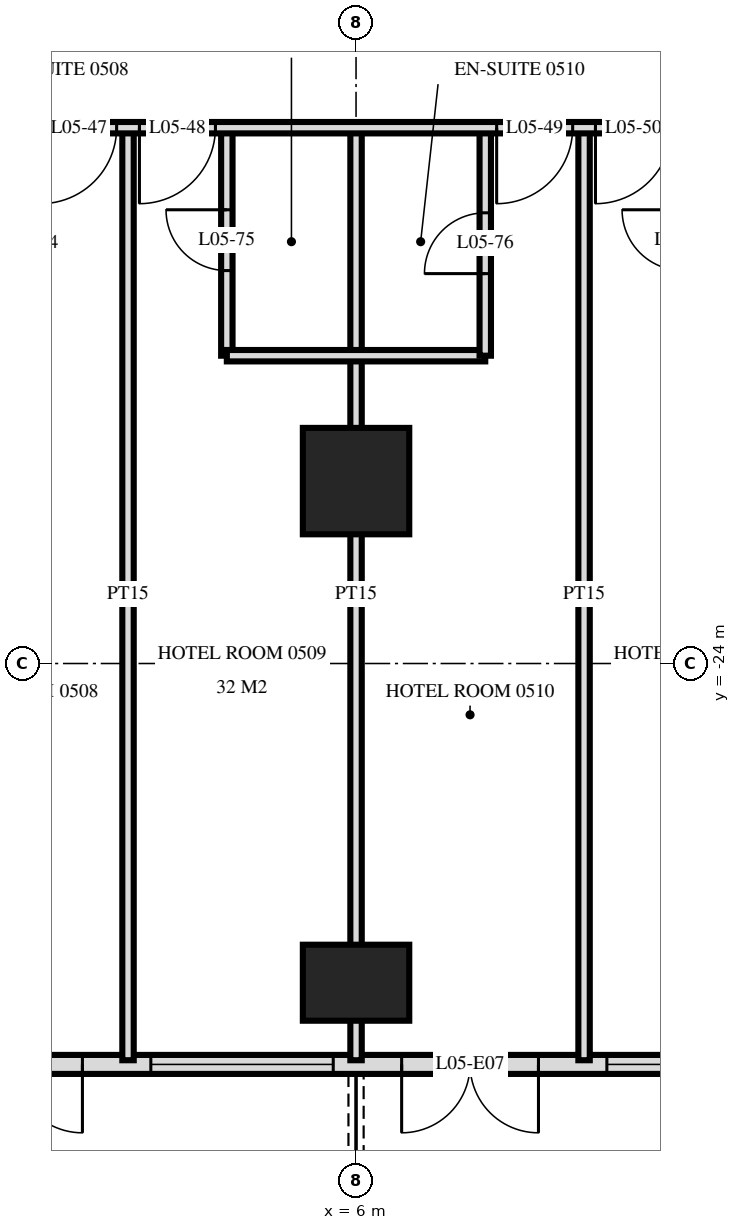
"""IFC4 building model, lengths in metres.
Left out: names, types, materials, properties, quantities, classifications, styles, units other than length and angle.
Written with IfcOpenShell. Run it as: python <this file> out.ifc"""

import sys

from ifc_helpers import new_model, si_unit, direction, frame, frame_2d, origin, origin_2d, place, context, subcontext, project, spatial, rectangle, extrude, element, fill, save


model = new_model("IFC4")
c1 = context("Model", 3, precision=1e-05, world=origin(), true_north=direction((0.0, 1.0)))
c2 = subcontext(c1, "Body", "Model", "MODEL_VIEW")
j1 = project(units=[si_unit("LENGTHUNIT", "METRE"), si_unit("PLANEANGLEUNIT", "RADIAN")], contexts=[c1])
p1 = place(None, origin())
s1 = spatial("IfcSite", under=j1, at=p1, CompositionType="ELEMENT")
p2 = place(p1, origin())
s2 = spatial("IfcBuilding", under=s1, at=p2, CompositionType="ELEMENT")
p3 = place(p2, frame((0.0, 0.0, 27.6)))
s3 = spatial("IfcBuildingStorey", under=s2, at=p3, CompositionType="ELEMENT", Elevation=27.6)
p4 = place(p3, frame((6.0, -28.2, 0.0), z_axis=(0.0, 0.0, 1.0), x_axis=(1.0, 0.0, 0.0)))
e1 = element("IfcColumn", 1, at=p4, inside=s3, PredefinedType="COLUMN", context=c2, shape_type="SweptSolid", body=[
    extrude(rectangle(XDim=1.4, YDim=1.0, at=origin_2d()), origin(), (0.0, 0.0, 1.0), 3.6),
])
p5 = place(p3, frame((6.0, -21.6, 0.0), z_axis=(0.0, 0.0, 1.0), x_axis=(1.0, 0.0, 0.0)))
e2 = element("IfcColumn", 2, at=p5, inside=s3, PredefinedType="COLUMN", context=c2, shape_type="SweptSolid", body=[
    extrude(rectangle(XDim=1.4, YDim=1.4, at=origin_2d()), origin(), (0.0, 0.0, 1.0), 3.6),
])
p6 = place(p3, frame((-28.775, -29.275, 0.0), z_axis=(0.0, 0.0, 1.0), x_axis=(1.0, 0.0, 0.0)))
e3 = element("IfcWall", 3, at=p6, inside=s3, PredefinedType="SOLIDWALL", context=c2, shape_type="SweptSolid", body=[
    extrude(rectangle(XDim=57.551, YDim=0.25, at=frame_2d((28.775, 0.0))), origin(), (0.0, 0.0, 1.0), 3.32),
])
p7 = place(p6, frame((0.575, 0.0, 0.0)))
e4 = element("IfcOpeningElement", 4, at=p7, cuts=e3, PredefinedType="OPENING", context=c2, shape_type="SweptSolid", body=[
    extrude(rectangle(XDim=1.8, YDim=2.4, at=frame_2d((0.9, 1.2))), frame((0.0, 0.135, 0.0), z_axis=(0.0, -1.0, 0.0), x_axis=(1.0, 0.0, 0.0)), (0.0, 0.0, 1.0), 0.27),
])
p8 = place(p6, frame((5.375, 0.0, 0.0)))
e5 = element("IfcOpeningElement", 5, at=p8, cuts=e3, PredefinedType="OPENING", context=c2, shape_type="SweptSolid", body=[
    extrude(rectangle(XDim=1.8, YDim=2.4, at=frame_2d((0.9, 1.2))), frame((0.0, 0.135, 0.0), z_axis=(0.0, -1.0, 0.0), x_axis=(1.0, 0.0, 0.0)), (0.0, 0.0, 1.0), 0.27),
])
p9 = place(p6, frame((8.075, 0.0, 0.3)))
e6 = element("IfcOpeningElement", 6, at=p9, cuts=e3, PredefinedType="OPENING", context=c2, shape_type="SweptSolid", body=[
    extrude(rectangle(XDim=2.4, YDim=2.1, at=frame_2d((1.2, 1.05))), frame((0.0, 0.135, 0.0), z_axis=(0.0, -1.0, 0.0), x_axis=(1.0, 0.0, 0.0)), (0.0, 0.0, 1.0), 0.27),
])
p10 = place(p6, frame((11.375, 0.0, 0.0)))
e7 = element("IfcOpeningElement", 7, at=p10, cuts=e3, PredefinedType="OPENING", context=c2, shape_type="SweptSolid", body=[
    extrude(rectangle(XDim=1.8, YDim=2.4, at=frame_2d((0.9, 1.2))), frame((0.0, 0.135, 0.0), z_axis=(0.0, -1.0, 0.0), x_axis=(1.0, 0.0, 0.0)), (0.0, 0.0, 1.0), 0.27),
])
p11 = place(p6, frame((14.075, 0.0, 0.3)))
e8 = element("IfcOpeningElement", 8, at=p11, cuts=e3, PredefinedType="OPENING", context=c2, shape_type="SweptSolid", body=[
    extrude(rectangle(XDim=2.4, YDim=2.1, at=frame_2d((1.2, 1.05))), frame((0.0, 0.135, 0.0), z_axis=(0.0, -1.0, 0.0), x_axis=(1.0, 0.0, 0.0)), (0.0, 0.0, 1.0), 0.27),
])
p12 = place(p6, frame((17.375, 0.0, 0.0)))
e9 = element("IfcOpeningElement", 9, at=p12, cuts=e3, PredefinedType="OPENING", context=c2, shape_type="SweptSolid", body=[
    extrude(rectangle(XDim=1.8, YDim=2.4, at=frame_2d((0.9, 1.2))), frame((0.0, 0.135, 0.0), z_axis=(0.0, -1.0, 0.0), x_axis=(1.0, 0.0, 0.0)), (0.0, 0.0, 1.0), 0.27),
])
p13 = place(p6, frame((20.075, 0.0, 0.3)))
e10 = element("IfcOpeningElement", 10, at=p13, cuts=e3, PredefinedType="OPENING", context=c2, shape_type="SweptSolid", body=[
    extrude(rectangle(XDim=2.4, YDim=2.1, at=frame_2d((1.2, 1.05))), frame((0.0, 0.135, 0.0), z_axis=(0.0, -1.0, 0.0), x_axis=(1.0, 0.0, 0.0)), (0.0, 0.0, 1.0), 0.27),
])
p14 = place(p6, frame((23.075, 0.0, 0.3)))
e11 = element("IfcOpeningElement", 11, at=p14, cuts=e3, PredefinedType="OPENING", context=c2, shape_type="SweptSolid", body=[
    extrude(rectangle(XDim=2.4, YDim=2.1, at=frame_2d((1.2, 1.05))), frame((0.0, 0.135, 0.0), z_axis=(0.0, -1.0, 0.0), x_axis=(1.0, 0.0, 0.0)), (0.0, 0.0, 1.0), 0.27),
])
p15 = place(p6, frame((26.375, 0.0, 0.0)))
e12 = element("IfcOpeningElement", 12, at=p15, cuts=e3, PredefinedType="OPENING", context=c2, shape_type="SweptSolid", body=[
    extrude(rectangle(XDim=1.8, YDim=2.4, at=frame_2d((0.9, 1.2))), frame((0.0, 0.135, 0.0), z_axis=(0.0, -1.0, 0.0), x_axis=(1.0, 0.0, 0.0)), (0.0, 0.0, 1.0), 0.27),
])
p16 = place(p6, frame((29.375, 0.0, 0.0)))
e13 = element("IfcOpeningElement", 13, at=p16, cuts=e3, PredefinedType="OPENING", context=c2, shape_type="SweptSolid", body=[
    extrude(rectangle(XDim=1.8, YDim=2.4, at=frame_2d((0.9, 1.2))), frame((0.0, 0.135, 0.0), z_axis=(0.0, -1.0, 0.0), x_axis=(1.0, 0.0, 0.0)), (0.0, 0.0, 1.0), 0.27),
])
p17 = place(p6, frame((32.075, 0.0, 0.3)))
e14 = element("IfcOpeningElement", 14, at=p17, cuts=e3, PredefinedType="OPENING", context=c2, shape_type="SweptSolid", body=[
    extrude(rectangle(XDim=2.4, YDim=2.1, at=frame_2d((1.2, 1.05))), frame((0.0, 0.135, 0.0), z_axis=(0.0, -1.0, 0.0), x_axis=(1.0, 0.0, 0.0)), (0.0, 0.0, 1.0), 0.27),
])
p18 = place(p6, frame((35.375, 0.0, 0.0)))
e15 = element("IfcOpeningElement", 15, at=p18, cuts=e3, PredefinedType="OPENING", context=c2, shape_type="SweptSolid", body=[
    extrude(rectangle(XDim=1.8, YDim=2.4, at=frame_2d((0.9, 1.2))), frame((0.0, 0.135, 0.0), z_axis=(0.0, -1.0, 0.0), x_axis=(1.0, 0.0, 0.0)), (0.0, 0.0, 1.0), 0.27),
])
p19 = place(p6, frame((38.075, 0.0, 0.3)))
e16 = element("IfcOpeningElement", 16, at=p19, cuts=e3, PredefinedType="OPENING", context=c2, shape_type="SweptSolid", body=[
    extrude(rectangle(XDim=2.4, YDim=2.1, at=frame_2d((1.2, 1.05))), frame((0.0, 0.135, 0.0), z_axis=(0.0, -1.0, 0.0), x_axis=(1.0, 0.0, 0.0)), (0.0, 0.0, 1.0), 0.27),
])
p20 = place(p6, frame((41.375, 0.0, 0.0)))
e17 = element("IfcOpeningElement", 17, at=p20, cuts=e3, PredefinedType="OPENING", context=c2, shape_type="SweptSolid", body=[
    extrude(rectangle(XDim=1.8, YDim=2.4, at=frame_2d((0.9, 1.2))), frame((0.0, 0.135, 0.0), z_axis=(0.0, -1.0, 0.0), x_axis=(1.0, 0.0, 0.0)), (0.0, 0.0, 1.0), 0.27),
])
p21 = place(p6, frame((44.075, 0.0, 0.3)))
e18 = element("IfcOpeningElement", 18, at=p21, cuts=e3, PredefinedType="OPENING", context=c2, shape_type="SweptSolid", body=[
    extrude(rectangle(XDim=2.4, YDim=2.1, at=frame_2d((1.2, 1.05))), frame((0.0, 0.135, 0.0), z_axis=(0.0, -1.0, 0.0), x_axis=(1.0, 0.0, 0.0)), (0.0, 0.0, 1.0), 0.27),
])
p22 = place(p6, frame((47.075, 0.0, 0.3)))
e19 = element("IfcOpeningElement", 19, at=p22, cuts=e3, PredefinedType="OPENING", context=c2, shape_type="SweptSolid", body=[
    extrude(rectangle(XDim=2.4, YDim=2.1, at=frame_2d((1.2, 1.05))), frame((0.0, 0.135, 0.0), z_axis=(0.0, -1.0, 0.0), x_axis=(1.0, 0.0, 0.0)), (0.0, 0.0, 1.0), 0.27),
])
p23 = place(p6, frame((50.375, 0.0, 0.0)))
e20 = element("IfcOpeningElement", 20, at=p23, cuts=e3, PredefinedType="OPENING", context=c2, shape_type="SweptSolid", body=[
    extrude(rectangle(XDim=1.8, YDim=2.4, at=frame_2d((0.9, 1.2))), frame((0.0, 0.135, 0.0), z_axis=(0.0, -1.0, 0.0), x_axis=(1.0, 0.0, 0.0)), (0.0, 0.0, 1.0), 0.27),
])
p24 = place(p6, frame((53.375, 0.0, 0.0)))
e21 = element("IfcOpeningElement", 21, at=p24, cuts=e3, PredefinedType="OPENING", context=c2, shape_type="SweptSolid", body=[
    extrude(rectangle(XDim=1.8, YDim=2.4, at=frame_2d((0.9, 1.2))), frame((0.0, 0.135, 0.0), z_axis=(0.0, -1.0, 0.0), x_axis=(1.0, 0.0, 0.0)), (0.0, 0.0, 1.0), 0.27),
])
p25 = place(p3, frame((9.0, -29.22, 0.0), z_axis=(0.0, 0.0, 1.0), x_axis=(0.0, 1.0, 0.0)))
e22 = element("IfcWall", 22, at=p25, inside=s3, PredefinedType="PARTITIONING", context=c2, shape_type="SweptSolid", body=[
    extrude(rectangle(XDim=12.27, YDim=0.15, at=frame_2d((6.135, 0.0))), origin(), (0.0, 0.0, 1.0), 3.32),
])
p26 = place(p3, frame((7.7, -19.95, 0.0), z_axis=(0.0, 0.0, 1.0), x_axis=(0.0, 1.0, 0.0)))
e23 = element("IfcWall", 23, at=p26, inside=s3, PredefinedType="PARTITIONING", context=c2, shape_type="SweptSolid", body=[
    extrude(rectangle(XDim=3.0, YDim=0.15, at=frame_2d((1.5, 0.0))), origin(), (0.0, 0.0, 1.0), 3.32),
])
p27 = place(p26, frame((1.08, 0.0, 0.0)))
e24 = element("IfcOpeningElement", 24, at=p27, cuts=e23, PredefinedType="OPENING", context=c2, shape_type="SweptSolid", body=[
    extrude(rectangle(XDim=0.8, YDim=2.1, at=frame_2d((0.4, 1.05))), frame((0.0, 0.085, 0.0), z_axis=(0.0, -1.0, 0.0), x_axis=(1.0, 0.0, 0.0)), (0.0, 0.0, 1.0), 0.17),
])
p28 = place(p3, frame((6.0, -29.22, 0.0), z_axis=(0.0, 0.0, 1.0), x_axis=(0.0, 1.0, 0.0)))
e25 = element("IfcWall", 25, at=p28, inside=s3, PredefinedType="PARTITIONING", context=c2, shape_type="SweptSolid", body=[
    extrude(rectangle(XDim=12.27, YDim=0.15, at=frame_2d((6.135, 0.0))), origin(), (0.0, 0.0, 1.0), 3.32),
])
p29 = place(p3, frame((4.3, -19.95, 0.0), z_axis=(0.0, 0.0, 1.0), x_axis=(0.0, 1.0, 0.0)))
e26 = element("IfcWall", 26, at=p29, inside=s3, PredefinedType="PARTITIONING", context=c2, shape_type="SweptSolid", body=[
    extrude(rectangle(XDim=3.0, YDim=0.15, at=frame_2d((1.5, 0.0))), origin(), (0.0, 0.0, 1.0), 3.32),
])
p30 = place(p29, frame((1.12, 0.0, 0.0)))
e27 = element("IfcOpeningElement", 27, at=p30, cuts=e26, PredefinedType="OPENING", context=c2, shape_type="SweptSolid", body=[
    extrude(rectangle(XDim=0.8, YDim=2.1, at=frame_2d((0.4, 1.05))), frame((0.0, 0.085, 0.0), z_axis=(0.0, -1.0, 0.0), x_axis=(1.0, 0.0, 0.0)), (0.0, 0.0, 1.0), 0.17),
])
p31 = place(p3, frame((3.0, -29.22, 0.0), z_axis=(0.0, 0.0, 1.0), x_axis=(0.0, 1.0, 0.0)))
e28 = element("IfcWall", 28, at=p31, inside=s3, PredefinedType="PARTITIONING", context=c2, shape_type="SweptSolid", body=[
    extrude(rectangle(XDim=12.27, YDim=0.15, at=frame_2d((6.135, 0.0))), origin(), (0.0, 0.0, 1.0), 3.32),
])
p32 = place(p3, frame((4.3, -19.95, 0.0), z_axis=(0.0, 0.0, 1.0), x_axis=(1.0, 0.0, 0.0)))
e29 = element("IfcWall", 29, at=p32, inside=s3, PredefinedType="PARTITIONING", context=c2, shape_type="SweptSolid", body=[
    extrude(rectangle(XDim=3.4, YDim=0.15, at=frame_2d((1.7, 0.0))), origin(), (0.0, 0.0, 1.0), 3.32),
])
p33 = place(p3, frame((-33.12, -16.95, 0.0), z_axis=(0.0, 0.0, 1.0), x_axis=(1.0, 0.0, 0.0)))
e30 = element("IfcWall", 30, at=p33, inside=s3, PredefinedType="PARTITIONING", context=c2, shape_type="SweptSolid", body=[
    extrude(rectangle(XDim=66.24, YDim=0.15, at=frame_2d((33.12, 0.0))), origin(), (0.0, 0.0, 1.0), 3.32),
])
p34 = place(p33, frame((9.27, 0.0, 0.0)))
e31 = element("IfcOpeningElement", 31, at=p34, cuts=e30, PredefinedType="OPENING", context=c2, shape_type="SweptSolid", body=[
    extrude(rectangle(XDim=1.0, YDim=2.1, at=frame_2d((0.5, 1.05))), frame((0.0, 0.085, 0.0), z_axis=(0.0, -1.0, 0.0), x_axis=(1.0, 0.0, 0.0)), (0.0, 0.0, 1.0), 0.17),
])
p35 = place(p33, frame((13.97, 0.0, 0.0)))
e32 = element("IfcOpeningElement", 32, at=p35, cuts=e30, PredefinedType="OPENING", context=c2, shape_type="SweptSolid", body=[
    extrude(rectangle(XDim=1.0, YDim=2.1, at=frame_2d((0.5, 1.05))), frame((0.0, 0.085, 0.0), z_axis=(0.0, -1.0, 0.0), x_axis=(1.0, 0.0, 0.0)), (0.0, 0.0, 1.0), 0.17),
])
p36 = place(p33, frame((15.27, 0.0, 0.0)))
e33 = element("IfcOpeningElement", 33, at=p36, cuts=e30, PredefinedType="OPENING", context=c2, shape_type="SweptSolid", body=[
    extrude(rectangle(XDim=1.0, YDim=2.1, at=frame_2d((0.5, 1.05))), frame((0.0, 0.085, 0.0), z_axis=(0.0, -1.0, 0.0), x_axis=(1.0, 0.0, 0.0)), (0.0, 0.0, 1.0), 0.17),
])
p37 = place(p33, frame((19.97, 0.0, 0.0)))
e34 = element("IfcOpeningElement", 34, at=p37, cuts=e30, PredefinedType="OPENING", context=c2, shape_type="SweptSolid", body=[
    extrude(rectangle(XDim=1.0, YDim=2.1, at=frame_2d((0.5, 1.05))), frame((0.0, 0.085, 0.0), z_axis=(0.0, -1.0, 0.0), x_axis=(1.0, 0.0, 0.0)), (0.0, 0.0, 1.0), 0.17),
])
p38 = place(p33, frame((22.27, 0.0, 0.0)))
e35 = element("IfcOpeningElement", 35, at=p38, cuts=e30, PredefinedType="OPENING", context=c2, shape_type="SweptSolid", body=[
    extrude(rectangle(XDim=1.0, YDim=2.1, at=frame_2d((0.5, 1.05))), frame((0.0, 0.085, 0.0), z_axis=(0.0, -1.0, 0.0), x_axis=(1.0, 0.0, 0.0)), (0.0, 0.0, 1.0), 0.17),
])
p39 = place(p33, frame((28.97, 0.0, 0.0)))
e36 = element("IfcOpeningElement", 36, at=p39, cuts=e30, PredefinedType="OPENING", context=c2, shape_type="SweptSolid", body=[
    extrude(rectangle(XDim=1.0, YDim=2.1, at=frame_2d((0.5, 1.05))), frame((0.0, 0.085, 0.0), z_axis=(0.0, -1.0, 0.0), x_axis=(1.0, 0.0, 0.0)), (0.0, 0.0, 1.0), 0.17),
])
p40 = place(p33, frame((30.27, 0.0, 0.0)))
e37 = element("IfcOpeningElement", 37, at=p40, cuts=e30, PredefinedType="OPENING", context=c2, shape_type="SweptSolid", body=[
    extrude(rectangle(XDim=1.0, YDim=2.1, at=frame_2d((0.5, 1.05))), frame((0.0, 0.085, 0.0), z_axis=(0.0, -1.0, 0.0), x_axis=(1.0, 0.0, 0.0)), (0.0, 0.0, 1.0), 0.17),
])
p41 = place(p33, frame((34.97, 0.0, 0.0)))
e38 = element("IfcOpeningElement", 38, at=p41, cuts=e30, PredefinedType="OPENING", context=c2, shape_type="SweptSolid", body=[
    extrude(rectangle(XDim=1.0, YDim=2.1, at=frame_2d((0.5, 1.05))), frame((0.0, 0.085, 0.0), z_axis=(0.0, -1.0, 0.0), x_axis=(1.0, 0.0, 0.0)), (0.0, 0.0, 1.0), 0.17),
])
p42 = place(p33, frame((36.27, 0.0, 0.0)))
e39 = element("IfcOpeningElement", 39, at=p42, cuts=e30, PredefinedType="OPENING", context=c2, shape_type="SweptSolid", body=[
    extrude(rectangle(XDim=1.0, YDim=2.1, at=frame_2d((0.5, 1.05))), frame((0.0, 0.085, 0.0), z_axis=(0.0, -1.0, 0.0), x_axis=(1.0, 0.0, 0.0)), (0.0, 0.0, 1.0), 0.17),
])
p43 = place(p33, frame((40.97, 0.0, 0.0)))
e40 = element("IfcOpeningElement", 40, at=p43, cuts=e30, PredefinedType="OPENING", context=c2, shape_type="SweptSolid", body=[
    extrude(rectangle(XDim=1.0, YDim=2.1, at=frame_2d((0.5, 1.05))), frame((0.0, 0.085, 0.0), z_axis=(0.0, -1.0, 0.0), x_axis=(1.0, 0.0, 0.0)), (0.0, 0.0, 1.0), 0.17),
])
p44 = place(p33, frame((42.27, 0.0, 0.0)))
e41 = element("IfcOpeningElement", 41, at=p44, cuts=e30, PredefinedType="OPENING", context=c2, shape_type="SweptSolid", body=[
    extrude(rectangle(XDim=1.0, YDim=2.1, at=frame_2d((0.5, 1.05))), frame((0.0, 0.085, 0.0), z_axis=(0.0, -1.0, 0.0), x_axis=(1.0, 0.0, 0.0)), (0.0, 0.0, 1.0), 0.17),
])
p45 = place(p33, frame((46.97, 0.0, 0.0)))
e42 = element("IfcOpeningElement", 42, at=p45, cuts=e30, PredefinedType="OPENING", context=c2, shape_type="SweptSolid", body=[
    extrude(rectangle(XDim=1.0, YDim=2.1, at=frame_2d((0.5, 1.05))), frame((0.0, 0.085, 0.0), z_axis=(0.0, -1.0, 0.0), x_axis=(1.0, 0.0, 0.0)), (0.0, 0.0, 1.0), 0.17),
])
p46 = place(p33, frame((48.27, 0.0, 0.0)))
e43 = element("IfcOpeningElement", 43, at=p46, cuts=e30, PredefinedType="OPENING", context=c2, shape_type="SweptSolid", body=[
    extrude(rectangle(XDim=1.0, YDim=2.1, at=frame_2d((0.5, 1.05))), frame((0.0, 0.085, 0.0), z_axis=(0.0, -1.0, 0.0), x_axis=(1.0, 0.0, 0.0)), (0.0, 0.0, 1.0), 0.17),
])
p47 = place(p33, frame((52.97, 0.0, 0.0)))
e44 = element("IfcOpeningElement", 44, at=p47, cuts=e30, PredefinedType="OPENING", context=c2, shape_type="SweptSolid", body=[
    extrude(rectangle(XDim=1.0, YDim=2.1, at=frame_2d((0.5, 1.05))), frame((0.0, 0.085, 0.0), z_axis=(0.0, -1.0, 0.0), x_axis=(1.0, 0.0, 0.0)), (0.0, 0.0, 1.0), 0.17),
])
p48 = place(p33, frame((54.27, 0.0, 0.0)))
e45 = element("IfcOpeningElement", 45, at=p48, cuts=e30, PredefinedType="OPENING", context=c2, shape_type="SweptSolid", body=[
    extrude(rectangle(XDim=1.0, YDim=2.1, at=frame_2d((0.5, 1.05))), frame((0.0, 0.085, 0.0), z_axis=(0.0, -1.0, 0.0), x_axis=(1.0, 0.0, 0.0)), (0.0, 0.0, 1.0), 0.17),
])
p49 = place(p33, frame((4.4, 0.0, 0.0)))
e46 = element("IfcOpeningElement", 46, at=p49, cuts=e30, PredefinedType="OPENING", context=c2, shape_type="SweptSolid", body=[
    extrude(rectangle(XDim=1.0, YDim=2.1, at=frame_2d((0.5, 1.05))), frame((0.0, 0.085, 0.0), z_axis=(0.0, -1.0, 0.0), x_axis=(1.0, 0.0, 0.0)), (0.0, 0.0, 1.0), 0.17),
])
p50 = place(p33, frame((60.8, 0.0, 0.0)))
e47 = element("IfcOpeningElement", 47, at=p50, cuts=e30, PredefinedType="OPENING", context=c2, shape_type="SweptSolid", body=[
    extrude(rectangle(XDim=1.0, YDim=2.1, at=frame_2d((0.5, 1.05))), frame((0.0, 0.085, 0.0), z_axis=(0.0, -1.0, 0.0), x_axis=(1.0, 0.0, 0.0)), (0.0, 0.0, 1.0), 0.17),
])
p51 = place(p16, frame((0.9, 0.0, 0.0), z_axis=(0.0, 0.0, 1.0), x_axis=(-1.0, 0.0, 0.0)))
e48 = element("IfcDoor", 48, at=p51, inside=s3, OperationType="DOUBLE_DOOR_SINGLE_SWING", PredefinedType="DOOR", context=c2, shape_type="SweptSolid", body=[
    extrude(rectangle(XDim=1.8, YDim=2.4, at=frame_2d((0.0, 1.2))), frame((0.0, -0.025, 0.0), z_axis=(0.0, 1.0, 0.0), x_axis=(-1.0, 0.0, 0.0)), (0.0, 0.0, 1.0), 0.05),
])
fill(e13, e48)
p52 = place(p17, origin())
e49 = element("IfcWindow", 49, at=p52, inside=s3, PartitioningType="SINGLE_PANEL", PredefinedType="WINDOW", context=c2, shape_type="SweptSolid", body=[
    extrude(rectangle(XDim=2.4, YDim=2.1, at=frame_2d((1.2, 1.05))), frame((0.0, 0.03, 0.0), z_axis=(0.0, -1.0, 0.0), x_axis=(1.0, 0.0, 0.0)), (0.0, 0.0, 1.0), 0.06),
])
fill(e14, e49)
p53 = place(p18, frame((0.9, 0.0, 0.0), z_axis=(0.0, 0.0, 1.0), x_axis=(-1.0, 0.0, 0.0)))
e50 = element("IfcDoor", 50, at=p53, inside=s3, OperationType="DOUBLE_DOOR_SINGLE_SWING", PredefinedType="DOOR", context=c2, shape_type="SweptSolid", body=[
    extrude(rectangle(XDim=1.8, YDim=2.4, at=frame_2d((0.0, 1.2))), frame((0.0, -0.025, 0.0), z_axis=(0.0, 1.0, 0.0), x_axis=(-1.0, 0.0, 0.0)), (0.0, 0.0, 1.0), 0.05),
])
fill(e15, e50)
p54 = place(p19, origin())
e51 = element("IfcWindow", 51, at=p54, inside=s3, PartitioningType="SINGLE_PANEL", PredefinedType="WINDOW", context=c2, shape_type="SweptSolid", body=[
    extrude(rectangle(XDim=2.4, YDim=2.1, at=frame_2d((1.2, 1.05))), frame((0.0, 0.03, 0.0), z_axis=(0.0, -1.0, 0.0), x_axis=(1.0, 0.0, 0.0)), (0.0, 0.0, 1.0), 0.06),
])
fill(e16, e51)
p55 = place(p41, frame((0.5, 0.0, 0.0), z_axis=(0.0, 0.0, 1.0), x_axis=(-1.0, 0.0, 0.0)))
e52 = element("IfcDoor", 52, at=p55, inside=s3, OperationType="SINGLE_SWING_LEFT", PredefinedType="DOOR", context=c2, shape_type="SweptSolid", body=[
    extrude(rectangle(XDim=1.0, YDim=2.1, at=frame_2d((0.0, 1.05))), frame((0.0, -0.025, 0.0), z_axis=(0.0, 1.0, 0.0), x_axis=(-1.0, 0.0, 0.0)), (0.0, 0.0, 1.0), 0.05),
])
fill(e38, e52)
p56 = place(p42, frame((0.5, 0.0, 0.0), z_axis=(0.0, 0.0, 1.0), x_axis=(-1.0, 0.0, 0.0)))
e53 = element("IfcDoor", 53, at=p56, inside=s3, OperationType="SINGLE_SWING_LEFT", PredefinedType="DOOR", context=c2, shape_type="SweptSolid", body=[
    extrude(rectangle(XDim=1.0, YDim=2.1, at=frame_2d((0.0, 1.05))), frame((0.0, -0.025, 0.0), z_axis=(0.0, 1.0, 0.0), x_axis=(-1.0, 0.0, 0.0)), (0.0, 0.0, 1.0), 0.05),
])
fill(e39, e53)
p57 = place(p43, frame((0.5, 0.0, 0.0), z_axis=(0.0, 0.0, 1.0), x_axis=(-1.0, 0.0, 0.0)))
e54 = element("IfcDoor", 54, at=p57, inside=s3, OperationType="SINGLE_SWING_LEFT", PredefinedType="DOOR", context=c2, shape_type="SweptSolid", body=[
    extrude(rectangle(XDim=1.0, YDim=2.1, at=frame_2d((0.0, 1.05))), frame((0.0, -0.025, 0.0), z_axis=(0.0, 1.0, 0.0), x_axis=(-1.0, 0.0, 0.0)), (0.0, 0.0, 1.0), 0.05),
])
fill(e40, e54)
p58 = place(p44, frame((0.5, 0.0, 0.0), z_axis=(0.0, 0.0, 1.0), x_axis=(-1.0, 0.0, 0.0)))
e55 = element("IfcDoor", 55, at=p58, inside=s3, OperationType="SINGLE_SWING_LEFT", PredefinedType="DOOR", context=c2, shape_type="SweptSolid", body=[
    extrude(rectangle(XDim=1.0, YDim=2.1, at=frame_2d((0.0, 1.05))), frame((0.0, -0.025, 0.0), z_axis=(0.0, 1.0, 0.0), x_axis=(-1.0, 0.0, 0.0)), (0.0, 0.0, 1.0), 0.05),
])
fill(e41, e55)
p59 = place(p30, origin())
e56 = element("IfcDoor", 56, at=p59, inside=s3, OperationType="SINGLE_SWING_LEFT", PredefinedType="DOOR", context=c2, shape_type="SweptSolid", body=[
    extrude(rectangle(XDim=0.8, YDim=2.1, at=frame_2d((0.4, 1.05))), frame((0.0, 0.025, 0.0), z_axis=(0.0, -1.0, 0.0), x_axis=(1.0, 0.0, 0.0)), (0.0, 0.0, 1.0), 0.05),
])
fill(e27, e56)
p60 = place(p27, origin())
e57 = element("IfcDoor", 57, at=p60, inside=s3, OperationType="SINGLE_SWING_RIGHT", PredefinedType="DOOR", context=c2, shape_type="SweptSolid", body=[
    extrude(rectangle(XDim=0.8, YDim=2.1, at=frame_2d((0.4, 1.05))), frame((0.0, 0.025, 0.0), z_axis=(0.0, -1.0, 0.0), x_axis=(1.0, 0.0, 0.0)), (0.0, 0.0, 1.0), 0.05),
])
fill(e24, e57)
save(model, sys.argv[1])
